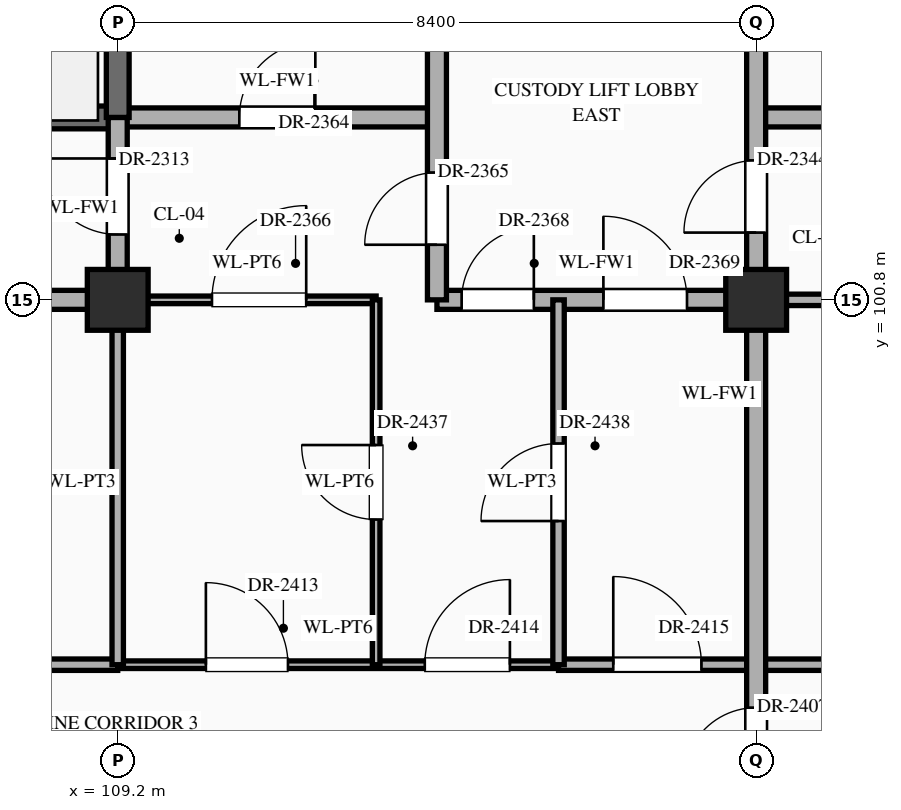
"""IFC4 building model, lengths in metres.
Left out: names, types, materials, properties, quantities, classifications, styles, units other than length and angle.
Written with IfcOpenShell. Run it as: python <this file> out.ifc"""

import sys

from ifc_helpers import new_model, si_unit, direction, frame, frame_2d, origin, origin_2d, place, context, subcontext, project, spatial, rectangle, extrude, element, fill, save


model = new_model("IFC4")
c1 = context("Model", 3, precision=1e-05, world=origin(), true_north=direction((0.0, 1.0)))
c2 = subcontext(c1, "Body", "Model", "MODEL_VIEW")
j1 = project(units=[si_unit("LENGTHUNIT", "METRE"), si_unit("PLANEANGLEUNIT", "RADIAN")], contexts=[c1])
p1 = place(None, origin())
s1 = spatial("IfcSite", under=j1, at=p1, CompositionType="ELEMENT")
p2 = place(p1, origin())
s2 = spatial("IfcBuilding", under=s1, at=p2, CompositionType="ELEMENT")
p3 = place(p2, frame((0.0, 0.0, 30.6)))
s3 = spatial("IfcBuildingStorey", under=s2, at=p3, CompositionType="ELEMENT", Elevation=30.6)
for number, where, z_axis, x_axis in (
    (1, (109.2, 100.8, 0.0), (0.0, 0.0, 1.0), (1.0, 0.0, 0.0)),
    (2, (117.6, 100.8, 0.0), (0.0, 0.0, 1.0), (1.0, 0.0, 0.0)),
):
    element("IfcColumn", number, at=place(p3, frame(where, z_axis=z_axis, x_axis=x_axis)), inside=s3, PredefinedType="COLUMN", context=c2, shape_type="SweptSolid", body=[
        extrude(rectangle(XDim=0.8, YDim=0.8, at=origin_2d()), origin(), (0.0, 0.0, 1.0), 4.5),
    ])
p4 = place(p3, frame((89.8, 96.0, 0.0), z_axis=(0.0, 0.0, 1.0), x_axis=(1.0, 0.0, 0.0)))
e3 = element("IfcWall", 3, at=p4, inside=s3, PredefinedType="STANDARD", context=c2, shape_type="SweptSolid", body=[
    extrude(rectangle(XDim=19.4, YDim=0.15, at=frame_2d((9.7, 0.0))), origin(), (0.0, 0.0, 1.0), 4.24),
])
p5 = place(p4, frame((0.82, 0.0, 0.0)))
e4 = element("IfcOpeningElement", 4, at=p5, cuts=e3, PredefinedType="OPENING", context=c2, shape_type="SweptSolid", body=[
    extrude(rectangle(XDim=0.96, YDim=2.2, at=frame_2d((0.48, 1.1))), frame((0.0, 0.087, 0.0), z_axis=(0.0, -1.0, 0.0), x_axis=(1.0, 0.0, 0.0)), (0.0, 0.0, 1.0), 0.174),
])
p6 = place(p4, frame((6.3, 0.0, 0.0)))
e5 = element("IfcOpeningElement", 5, at=p6, cuts=e3, PredefinedType="OPENING", context=c2, shape_type="SweptSolid", body=[
    extrude(rectangle(XDim=1.0, YDim=2.25, at=frame_2d((0.5, 1.125))), frame((0.0, 0.087, 0.0), z_axis=(0.0, -1.0, 0.0), x_axis=(1.0, 0.0, 0.0)), (0.0, 0.0, 1.0), 0.174),
])
p7 = place(p4, frame((14.68, 0.0, 0.0)))
e6 = element("IfcOpeningElement", 6, at=p7, cuts=e3, PredefinedType="OPENING", context=c2, shape_type="SweptSolid", body=[
    extrude(rectangle(XDim=1.04, YDim=2.2, at=frame_2d((0.52, 1.1))), frame((0.0, 0.087, 0.0), z_axis=(0.0, -1.0, 0.0), x_axis=(1.0, 0.0, 0.0)), (0.0, 0.0, 1.0), 0.174),
])
p8 = place(p3, frame((109.2, 96.0, 0.0), z_axis=(0.0, 0.0, 1.0), x_axis=(1.0, 0.0, 0.0)))
e7 = element("IfcWall", 7, at=p8, inside=s3, PredefinedType="STANDARD", context=c2, shape_type="SweptSolid", body=[
    extrude(rectangle(XDim=5.8, YDim=0.1, at=frame_2d((2.9, 0.0))), origin(), (0.0, 0.0, 1.0), 4.24),
])
p9 = place(p8, frame((1.16, 0.0, 0.0)))
e8 = element("IfcOpeningElement", 8, at=p9, cuts=e7, PredefinedType="OPENING", context=c2, shape_type="SweptSolid", body=[
    extrude(rectangle(XDim=1.08, YDim=2.25, at=frame_2d((0.54, 1.125))), frame((0.0, 0.062, 0.0), z_axis=(0.0, -1.0, 0.0), x_axis=(1.0, 0.0, 0.0)), (0.0, 0.0, 1.0), 0.124),
])
p10 = place(p8, frame((4.04, 0.0, 0.0)))
e9 = element("IfcOpeningElement", 9, at=p10, cuts=e7, PredefinedType="OPENING", context=c2, shape_type="SweptSolid", body=[
    extrude(rectangle(XDim=1.12, YDim=2.25, at=frame_2d((0.56, 1.125))), frame((0.0, 0.062, 0.0), z_axis=(0.0, -1.0, 0.0), x_axis=(1.0, 0.0, 0.0)), (0.0, 0.0, 1.0), 0.124),
])
p11 = place(p3, frame((115.0, 96.0, 0.0), z_axis=(0.0, 0.0, 1.0), x_axis=(1.0, 0.0, 0.0)))
e10 = element("IfcWall", 10, at=p11, inside=s3, PredefinedType="STANDARD", context=c2, shape_type="SweptSolid", body=[
    extrude(rectangle(XDim=19.4, YDim=0.15, at=frame_2d((9.7, 0.0))), origin(), (0.0, 0.0, 1.0), 4.24),
])
p12 = place(p11, frame((0.72, 0.0, 0.0)))
e11 = element("IfcOpeningElement", 11, at=p12, cuts=e10, PredefinedType="OPENING", context=c2, shape_type="SweptSolid", body=[
    extrude(rectangle(XDim=1.16, YDim=2.3, at=frame_2d((0.58, 1.15))), frame((0.0, 0.087, 0.0), z_axis=(0.0, -1.0, 0.0), x_axis=(1.0, 0.0, 0.0)), (0.0, 0.0, 1.0), 0.174),
])
p13 = place(p11, frame((6.27, 0.0, 0.0)))
e12 = element("IfcOpeningElement", 12, at=p13, cuts=e10, PredefinedType="OPENING", context=c2, shape_type="SweptSolid", body=[
    extrude(rectangle(XDim=1.06, YDim=2.4, at=frame_2d((0.53, 1.2))), frame((0.0, 0.087, 0.0), z_axis=(0.0, -1.0, 0.0), x_axis=(1.0, 0.0, 0.0)), (0.0, 0.0, 1.0), 0.174),
])
p14 = place(p11, frame((14.63, 0.0, 0.0)))
e13 = element("IfcOpeningElement", 13, at=p14, cuts=e10, PredefinedType="OPENING", context=c2, shape_type="SweptSolid", body=[
    extrude(rectangle(XDim=1.14, YDim=2.4, at=frame_2d((0.57, 1.2))), frame((0.0, 0.087, 0.0), z_axis=(0.0, -1.0, 0.0), x_axis=(1.0, 0.0, 0.0)), (0.0, 0.0, 1.0), 0.174),
])
p15 = place(p3, frame((96.6, 100.8, 0.0), z_axis=(0.0, 0.0, 1.0), x_axis=(1.0, 0.0, 0.0)))
e14 = element("IfcWall", 14, at=p15, inside=s3, PredefinedType="STANDARD", context=c2, shape_type="SweptSolid", body=[
    extrude(rectangle(XDim=12.6, YDim=0.25, at=frame_2d((6.3, 0.0))), origin(), (0.0, 0.0, 1.0), 3.39),
])
p16 = place(p15, frame((7.925, 0.0, 0.0)))
e15 = element("IfcOpeningElement", 15, at=p16, cuts=e14, PredefinedType="OPENING", context=c2, shape_type="SweptSolid", body=[
    extrude(rectangle(XDim=0.95, YDim=2.15, at=frame_2d((0.475, 1.075))), frame((0.0, 0.137, 0.0), z_axis=(0.0, -1.0, 0.0), x_axis=(1.0, 0.0, 0.0)), (0.0, 0.0, 1.0), 0.274),
])
p17 = place(p3, frame((109.2, 100.8, 0.0), z_axis=(0.0, 0.0, 1.0), x_axis=(1.0, 0.0, 0.0)))
e16 = element("IfcWall", 16, at=p17, inside=s3, PredefinedType="STANDARD", context=c2, shape_type="SweptSolid", body=[
    extrude(rectangle(XDim=3.4, YDim=0.1, at=frame_2d((1.7, 0.0))), origin(), (0.0, 0.0, 1.0), 3.39),
])
p18 = place(p17, frame((1.24, 0.0, 0.0)))
e17 = element("IfcOpeningElement", 17, at=p18, cuts=e16, PredefinedType="OPENING", context=c2, shape_type="SweptSolid", body=[
    extrude(rectangle(XDim=1.24, YDim=2.3, at=frame_2d((0.62, 1.15))), frame((0.0, 0.062, 0.0), z_axis=(0.0, -1.0, 0.0), x_axis=(1.0, 0.0, 0.0)), (0.0, 0.0, 1.0), 0.124),
])
p19 = place(p3, frame((113.4, 100.8, 0.0), z_axis=(0.0, 0.0, 1.0), x_axis=(1.0, 0.0, 0.0)))
e18 = element("IfcWall", 18, at=p19, inside=s3, PredefinedType="STANDARD", context=c2, shape_type="SweptSolid", body=[
    extrude(rectangle(XDim=4.2, YDim=0.25, at=frame_2d((2.1, 0.0))), origin(), (0.0, 0.0, 1.0), 3.39),
])
p20 = place(p19, frame((0.325, 0.0, 0.0)))
e19 = element("IfcOpeningElement", 19, at=p20, cuts=e18, PredefinedType="OPENING", context=c2, shape_type="SweptSolid", body=[
    extrude(rectangle(XDim=0.95, YDim=2.15, at=frame_2d((0.475, 1.075))), frame((0.0, 0.137, 0.0), z_axis=(0.0, -1.0, 0.0), x_axis=(1.0, 0.0, 0.0)), (0.0, 0.0, 1.0), 0.274),
])
p21 = place(p19, frame((2.19, 0.0, 0.0)))
e20 = element("IfcOpeningElement", 20, at=p21, cuts=e18, PredefinedType="OPENING", context=c2, shape_type="SweptSolid", body=[
    extrude(rectangle(XDim=1.1, YDim=2.2, at=frame_2d((0.55, 1.1))), frame((0.0, 0.137, 0.0), z_axis=(0.0, -1.0, 0.0), x_axis=(1.0, 0.0, 0.0)), (0.0, 0.0, 1.0), 0.274),
])
p22 = place(p3, frame((117.6, 100.8, 0.0), z_axis=(0.0, 0.0, 1.0), x_axis=(1.0, 0.0, 0.0)))
e21 = element("IfcWall", 21, at=p22, inside=s3, PredefinedType="STANDARD", context=c2, shape_type="SweptSolid", body=[
    extrude(rectangle(XDim=4.2, YDim=0.15, at=frame_2d((2.1, 0.0))), origin(), (0.0, 0.0, 1.0), 3.39),
])
p23 = place(p22, frame((1.72, 0.0, 0.0)))
e22 = element("IfcOpeningElement", 22, at=p23, cuts=e21, PredefinedType="OPENING", context=c2, shape_type="SweptSolid", body=[
    extrude(rectangle(XDim=1.08, YDim=2.25, at=frame_2d((0.54, 1.125))), frame((0.0, 0.087, 0.0), z_axis=(0.0, -1.0, 0.0), x_axis=(1.0, 0.0, 0.0)), (0.0, 0.0, 1.0), 0.174),
])
p24 = place(p3, frame((100.8, 103.2, 0.0), z_axis=(0.0, 0.0, 1.0), x_axis=(1.0, 0.0, 0.0)))
e23 = element("IfcWall", 23, at=p24, inside=s3, PredefinedType="SHEAR", context=c2, shape_type="SweptSolid", body=[
    extrude(rectangle(XDim=8.4, YDim=0.3, at=frame_2d((4.2, 0.0))), origin(), (0.0, 0.0, 1.0), 4.24),
])
p25 = place(p24, frame((0.65, 0.0, 0.0)))
e24 = element("IfcOpeningElement", 24, at=p25, cuts=e23, PredefinedType="OPENING", context=c2, shape_type="SweptSolid", body=[
    extrude(rectangle(XDim=1.1, YDim=2.2, at=frame_2d((0.55, 1.1))), frame((0.0, 0.162, 0.0), z_axis=(0.0, -1.0, 0.0), x_axis=(1.0, 0.0, 0.0)), (0.0, 0.0, 1.0), 0.324),
])
p26 = place(p3, frame((109.2, 103.2, 0.0), z_axis=(0.0, 0.0, 1.0), x_axis=(1.0, 0.0, 0.0)))
e25 = element("IfcWall", 25, at=p26, inside=s3, PredefinedType="STANDARD", context=c2, shape_type="SweptSolid", body=[
    extrude(rectangle(XDim=4.2, YDim=0.25, at=frame_2d((2.1, 0.0))), origin(), (0.0, 0.0, 1.0), 4.24),
])
p27 = place(p26, frame((1.6, 0.0, 0.0)))
e26 = element("IfcOpeningElement", 26, at=p27, cuts=e25, PredefinedType="OPENING", context=c2, shape_type="SweptSolid", body=[
    extrude(rectangle(XDim=1.0, YDim=2.2, at=frame_2d((0.5, 1.1))), frame((0.0, 0.137, 0.0), z_axis=(0.0, -1.0, 0.0), x_axis=(1.0, 0.0, 0.0)), (0.0, 0.0, 1.0), 0.274),
])
p28 = place(p3, frame((117.6, 103.2, 0.0), z_axis=(0.0, 0.0, 1.0), x_axis=(1.0, 0.0, 0.0)))
e27 = element("IfcWall", 27, at=p28, inside=s3, PredefinedType="STANDARD", context=c2, shape_type="SweptSolid", body=[
    extrude(rectangle(XDim=4.2, YDim=0.25, at=frame_2d((2.1, 0.0))), origin(), (0.0, 0.0, 1.0), 4.24),
])
p29 = place(p28, frame((1.55, 0.0, 0.0)))
e28 = element("IfcOpeningElement", 28, at=p29, cuts=e27, PredefinedType="OPENING", context=c2, shape_type="SweptSolid", body=[
    extrude(rectangle(XDim=1.1, YDim=2.2, at=frame_2d((0.55, 1.1))), frame((0.0, 0.137, 0.0), z_axis=(0.0, -1.0, 0.0), x_axis=(1.0, 0.0, 0.0)), (0.0, 0.0, 1.0), 0.274),
])
p30 = place(p3, frame((109.2, 96.0, 0.0), z_axis=(0.0, 0.0, 1.0), x_axis=(0.0, 1.0, 0.0)))
e29 = element("IfcWall", 29, at=p30, inside=s3, PredefinedType="STANDARD", context=c2, shape_type="SweptSolid", body=[
    extrude(rectangle(XDim=4.8, YDim=0.15, at=frame_2d((2.4, 0.0))), origin(), (0.0, 0.0, 1.0), 3.49),
])
p31 = place(p3, frame((109.2, 100.8, 0.0), z_axis=(0.0, 0.0, 1.0), x_axis=(0.0, 1.0, 0.0)))
e30 = element("IfcWall", 30, at=p31, inside=s3, PredefinedType="STANDARD", context=c2, shape_type="SweptSolid", body=[
    extrude(rectangle(XDim=2.4, YDim=0.25, at=frame_2d((1.2, 0.0))), origin(), (0.0, 0.0, 1.0), 3.49),
])
p32 = place(p31, frame((0.86, 0.0, 0.0)))
e31 = element("IfcOpeningElement", 31, at=p32, cuts=e30, PredefinedType="OPENING", context=c2, shape_type="SweptSolid", body=[
    extrude(rectangle(XDim=1.0, YDim=2.2, at=frame_2d((0.5, 1.1))), frame((0.0, 0.137, 0.0), z_axis=(0.0, -1.0, 0.0), x_axis=(1.0, 0.0, 0.0)), (0.0, 0.0, 1.0), 0.274),
])
p33 = place(p3, frame((109.2, 103.2, 0.0), z_axis=(0.0, 0.0, 1.0), x_axis=(0.0, 1.0, 0.0)))
e32 = element("IfcWall", 32, at=p33, inside=s3, PredefinedType="SHEAR", context=c2, shape_type="SweptSolid", body=[
    extrude(rectangle(XDim=4.8, YDim=0.3, at=frame_2d((2.4, 0.0))), origin(), (0.0, 0.0, 1.0), 4.24),
])
p34 = place(p3, frame((112.6, 96.0, 0.0), z_axis=(0.0, 0.0, 1.0), x_axis=(0.0, 1.0, 0.0)))
e33 = element("IfcWall", 33, at=p34, inside=s3, PredefinedType="STANDARD", context=c2, shape_type="SweptSolid", body=[
    extrude(rectangle(XDim=4.8, YDim=0.1, at=frame_2d((2.4, 0.0))), origin(), (0.0, 0.0, 1.0), 4.24),
])
p35 = place(p34, frame((1.91, 0.0, 0.0)))
e34 = element("IfcOpeningElement", 34, at=p35, cuts=e33, PredefinedType="OPENING", context=c2, shape_type="SweptSolid", body=[
    extrude(rectangle(XDim=0.98, YDim=2.35, at=frame_2d((0.49, 1.175))), frame((0.0, 0.062, 0.0), z_axis=(0.0, -1.0, 0.0), x_axis=(1.0, 0.0, 0.0)), (0.0, 0.0, 1.0), 0.124),
])
p36 = place(p3, frame((113.4, 100.8, 0.0), z_axis=(0.0, 0.0, 1.0), x_axis=(0.0, 1.0, 0.0)))
e35 = element("IfcWall", 35, at=p36, inside=s3, PredefinedType="STANDARD", context=c2, shape_type="SweptSolid", body=[
    extrude(rectangle(XDim=3.6, YDim=0.25, at=frame_2d((1.8, 0.0))), origin(), (0.0, 0.0, 1.0), 3.84),
])
p37 = place(p36, frame((0.725, 0.0, 0.0)))
e36 = element("IfcOpeningElement", 36, at=p37, cuts=e35, PredefinedType="OPENING", context=c2, shape_type="SweptSolid", body=[
    extrude(rectangle(XDim=0.95, YDim=2.15, at=frame_2d((0.475, 1.075))), frame((0.0, 0.137, 0.0), z_axis=(0.0, -1.0, 0.0), x_axis=(1.0, 0.0, 0.0)), (0.0, 0.0, 1.0), 0.274),
])
p38 = place(p3, frame((115.0, 96.0, 0.0), z_axis=(0.0, 0.0, 1.0), x_axis=(0.0, 1.0, 0.0)))
e37 = element("IfcWall", 37, at=p38, inside=s3, PredefinedType="STANDARD", context=c2, shape_type="SweptSolid", body=[
    extrude(rectangle(XDim=4.8, YDim=0.15, at=frame_2d((2.4, 0.0))), origin(), (0.0, 0.0, 1.0), 4.24),
])
p39 = place(p38, frame((1.89, 0.0, 0.0)))
e38 = element("IfcOpeningElement", 38, at=p39, cuts=e37, PredefinedType="OPENING", context=c2, shape_type="SweptSolid", body=[
    extrude(rectangle(XDim=1.02, YDim=2.4, at=frame_2d((0.51, 1.2))), frame((0.0, 0.087, 0.0), z_axis=(0.0, -1.0, 0.0), x_axis=(1.0, 0.0, 0.0)), (0.0, 0.0, 1.0), 0.174),
])
p40 = place(p3, frame((117.6, 91.2, 0.0), z_axis=(0.0, 0.0, 1.0), x_axis=(0.0, 1.0, 0.0)))
e39 = element("IfcWall", 39, at=p40, inside=s3, PredefinedType="STANDARD", context=c2, shape_type="SweptSolid", body=[
    extrude(rectangle(XDim=13.2, YDim=0.25, at=frame_2d((6.6, 0.0))), origin(), (0.0, 0.0, 1.0), 3.49),
])
p41 = place(p40, frame((0.54, 0.0, 0.0)))
e40 = element("IfcOpeningElement", 40, at=p41, cuts=e39, PredefinedType="OPENING", context=c2, shape_type="SweptSolid", body=[
    extrude(rectangle(XDim=1.0, YDim=2.2, at=frame_2d((0.5, 1.1))), frame((0.0, 0.137, 0.0), z_axis=(0.0, -1.0, 0.0), x_axis=(1.0, 0.0, 0.0)), (0.0, 0.0, 1.0), 0.274),
])
p42 = place(p40, frame((10.485, 0.0, 0.0)))
e41 = element("IfcOpeningElement", 41, at=p42, cuts=e39, PredefinedType="OPENING", context=c2, shape_type="SweptSolid", body=[
    extrude(rectangle(XDim=0.95, YDim=2.15, at=frame_2d((0.475, 1.075))), frame((0.0, 0.137, 0.0), z_axis=(0.0, -1.0, 0.0), x_axis=(1.0, 0.0, 0.0)), (0.0, 0.0, 1.0), 0.274),
])
p43 = place(p40, frame((3.285, 0.0, 0.0)))
e42 = element("IfcOpeningElement", 42, at=p43, cuts=e39, PredefinedType="OPENING", context=c2, shape_type="SweptSolid", body=[
    extrude(rectangle(XDim=0.95, YDim=2.15, at=frame_2d((0.475, 1.075))), frame((0.0, 0.137, 0.0), z_axis=(0.0, -1.0, 0.0), x_axis=(1.0, 0.0, 0.0)), (0.0, 0.0, 1.0), 0.274),
])
p44 = place(p32, origin())
e43 = element("IfcDoor", 43, at=p44, inside=s3, OperationType="SINGLE_SWING_RIGHT", PredefinedType="DOOR", context=c2, shape_type="SweptSolid", body=[
    extrude(rectangle(XDim=1.0, YDim=2.2, at=frame_2d((0.5, 1.1))), frame((0.0, 0.025, 0.0), z_axis=(0.0, -1.0, 0.0), x_axis=(1.0, 0.0, 0.0)), (0.0, 0.0, 1.0), 0.05),
])
fill(e31, e43)
p45 = place(p42, origin())
e44 = element("IfcDoor", 44, at=p45, inside=s3, OperationType="SINGLE_SWING_LEFT", PredefinedType="DOOR", context=c2, shape_type="SweptSolid", body=[
    extrude(rectangle(XDim=0.95, YDim=2.15, at=frame_2d((0.475, 1.075))), frame((0.0, 0.025, 0.0), z_axis=(0.0, -1.0, 0.0), x_axis=(1.0, 0.0, 0.0)), (0.0, 0.0, 1.0), 0.05),
])
fill(e41, e44)
p46 = place(p27, origin())
e45 = element("IfcDoor", 45, at=p46, inside=s3, OperationType="SINGLE_SWING_RIGHT", PredefinedType="DOOR", context=c2, shape_type="SweptSolid", body=[
    extrude(rectangle(XDim=1.0, YDim=2.2, at=frame_2d((0.5, 1.1))), frame((0.0, 0.025, 0.0), z_axis=(0.0, -1.0, 0.0), x_axis=(1.0, 0.0, 0.0)), (0.0, 0.0, 1.0), 0.05),
])
fill(e26, e45)
p47 = place(p37, origin())
e46 = element("IfcDoor", 46, at=p47, inside=s3, OperationType="SINGLE_SWING_LEFT", PredefinedType="DOOR", context=c2, shape_type="SweptSolid", body=[
    extrude(rectangle(XDim=0.95, YDim=2.15, at=frame_2d((0.475, 1.075))), frame((0.0, 0.025, 0.0), z_axis=(0.0, -1.0, 0.0), x_axis=(1.0, 0.0, 0.0)), (0.0, 0.0, 1.0), 0.05),
])
fill(e36, e46)
p48 = place(p18, origin())
e47 = element("IfcDoor", 47, at=p48, inside=s3, OperationType="SINGLE_SWING_RIGHT", PredefinedType="DOOR", context=c2, shape_type="SweptSolid", body=[
    extrude(rectangle(XDim=1.24, YDim=2.3, at=frame_2d((0.62, 1.15))), frame((0.0, 0.025, 0.0), z_axis=(0.0, -1.0, 0.0), x_axis=(1.0, 0.0, 0.0)), (0.0, 0.0, 1.0), 0.05),
])
fill(e17, e47)
p49 = place(p20, origin())
e48 = element("IfcDoor", 48, at=p49, inside=s3, OperationType="SINGLE_SWING_RIGHT", PredefinedType="DOOR", context=c2, shape_type="SweptSolid", body=[
    extrude(rectangle(XDim=0.95, YDim=2.15, at=frame_2d((0.475, 1.075))), frame((0.0, 0.025, 0.0), z_axis=(0.0, -1.0, 0.0), x_axis=(1.0, 0.0, 0.0)), (0.0, 0.0, 1.0), 0.05),
])
fill(e19, e48)
p50 = place(p21, origin())
e49 = element("IfcDoor", 49, at=p50, inside=s3, OperationType="SINGLE_SWING_LEFT", PredefinedType="DOOR", context=c2, shape_type="SweptSolid", body=[
    extrude(rectangle(XDim=1.1, YDim=2.2, at=frame_2d((0.55, 1.1))), frame((0.0, 0.025, 0.0), z_axis=(0.0, -1.0, 0.0), x_axis=(1.0, 0.0, 0.0)), (0.0, 0.0, 1.0), 0.05),
])
fill(e20, e49)
p51 = place(p43, origin())
e50 = element("IfcDoor", 50, at=p51, inside=s3, OperationType="SINGLE_SWING_LEFT", PredefinedType="DOOR", context=c2, shape_type="SweptSolid", body=[
    extrude(rectangle(XDim=0.95, YDim=2.15, at=frame_2d((0.475, 1.075))), frame((0.0, 0.025, 0.0), z_axis=(0.0, -1.0, 0.0), x_axis=(1.0, 0.0, 0.0)), (0.0, 0.0, 1.0), 0.05),
])
fill(e42, e50)
p52 = place(p9, origin())
e51 = element("IfcDoor", 51, at=p52, inside=s3, OperationType="SINGLE_SWING_LEFT", PredefinedType="DOOR", context=c2, shape_type="SweptSolid", body=[
    extrude(rectangle(XDim=1.08, YDim=2.25, at=frame_2d((0.54, 1.125))), frame((0.0, 0.025, 0.0), z_axis=(0.0, -1.0, 0.0), x_axis=(1.0, 0.0, 0.0)), (0.0, 0.0, 1.0), 0.05),
])
fill(e8, e51)
p53 = place(p10, origin())
e52 = element("IfcDoor", 52, at=p53, inside=s3, OperationType="SINGLE_SWING_RIGHT", PredefinedType="DOOR", context=c2, shape_type="SweptSolid", body=[
    extrude(rectangle(XDim=1.12, YDim=2.25, at=frame_2d((0.56, 1.125))), frame((0.0, 0.025, 0.0), z_axis=(0.0, -1.0, 0.0), x_axis=(1.0, 0.0, 0.0)), (0.0, 0.0, 1.0), 0.05),
])
fill(e9, e52)
p54 = place(p12, origin())
e53 = element("IfcDoor", 53, at=p54, inside=s3, OperationType="SINGLE_SWING_LEFT", PredefinedType="DOOR", context=c2, shape_type="SweptSolid", body=[
    extrude(rectangle(XDim=1.16, YDim=2.3, at=frame_2d((0.58, 1.15))), frame((0.0, 0.025, 0.0), z_axis=(0.0, -1.0, 0.0), x_axis=(1.0, 0.0, 0.0)), (0.0, 0.0, 1.0), 0.05),
])
fill(e11, e53)
p55 = place(p35, origin())
e54 = element("IfcDoor", 54, at=p55, inside=s3, OperationType="SINGLE_SWING_RIGHT", PredefinedType="DOOR", context=c2, shape_type="SweptSolid", body=[
    extrude(rectangle(XDim=0.98, YDim=2.35, at=frame_2d((0.49, 1.175))), frame((0.0, 0.025, 0.0), z_axis=(0.0, -1.0, 0.0), x_axis=(1.0, 0.0, 0.0)), (0.0, 0.0, 1.0), 0.05),
])
fill(e34, e54)
p56 = place(p39, origin())
e55 = element("IfcDoor", 55, at=p56, inside=s3, OperationType="SINGLE_SWING_LEFT", PredefinedType="DOOR", context=c2, shape_type="SweptSolid", body=[
    extrude(rectangle(XDim=1.02, YDim=2.4, at=frame_2d((0.51, 1.2))), frame((0.0, 0.025, 0.0), z_axis=(0.0, -1.0, 0.0), x_axis=(1.0, 0.0, 0.0)), (0.0, 0.0, 1.0), 0.05),
])
fill(e38, e55)
save(model, sys.argv[1])
